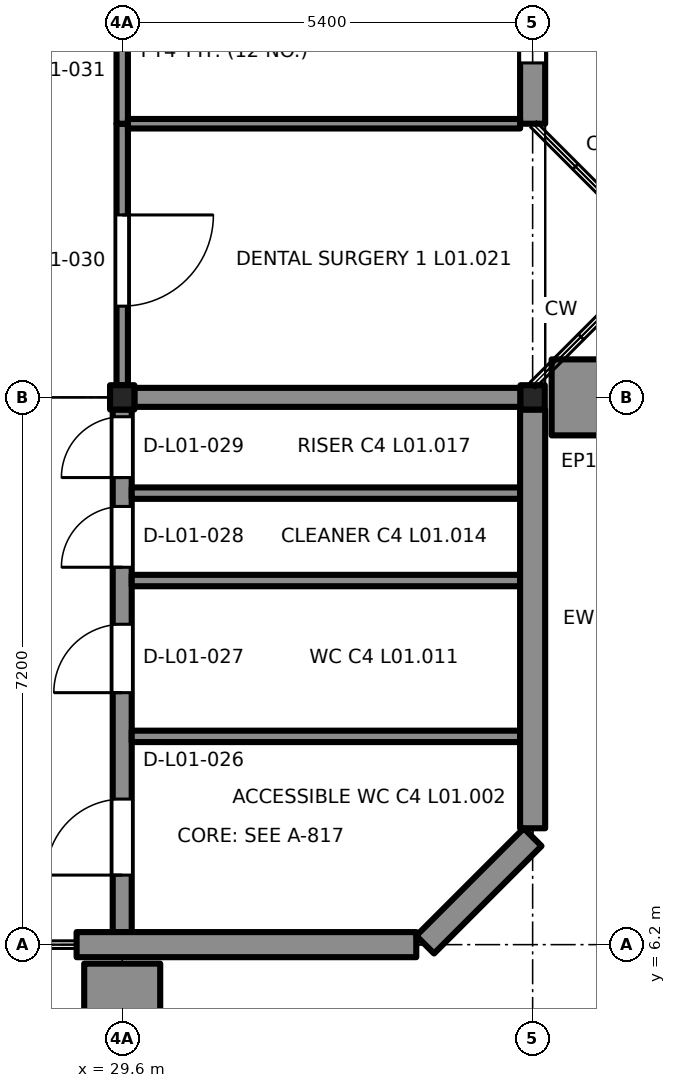
"""IFC4 building model, lengths in metres.
Left out: names, types, materials, properties, quantities, classifications, styles, units other than length and angle.
Written with IfcOpenShell. Run it as: python <this file> out.ifc"""

import sys

from ifc_helpers import new_model, si_unit, direction, frame, frame_2d, origin, origin_2d, place, context, subcontext, project, spatial, rectangle, extrude, element, fill, save


model = new_model("IFC4")
c1 = context("Model", 3, precision=1e-05, world=origin(), true_north=direction((0.0, 1.0)))
c2 = subcontext(c1, "Body", "Model", "MODEL_VIEW")
j1 = project(units=[si_unit("LENGTHUNIT", "METRE"), si_unit("PLANEANGLEUNIT", "RADIAN")], contexts=[c1])
p1 = place(None, origin())
s1 = spatial("IfcSite", under=j1, at=p1, CompositionType="ELEMENT")
p2 = place(p1, origin())
s2 = spatial("IfcBuilding", under=s1, at=p2, CompositionType="ELEMENT")
p3 = place(p2, frame((0.0, 0.0, 6.3)))
s3 = spatial("IfcBuildingStorey", under=s2, at=p3, CompositionType="ELEMENT", Elevation=6.3)
for number, where, z_axis, x_axis in (
    (1, (29.6, 13.4, 0.0), (0.0, 0.0, 1.0), (1.0, 0.0, 0.0)),
    (2, (35.0, 13.4, 0.0), (0.0, 0.0, 1.0), (1.0, 0.0, 0.0)),
):
    element("IfcColumn", number, at=place(p3, frame(where, z_axis=z_axis, x_axis=x_axis)), inside=s3, PredefinedType="COLUMN", context=c2, shape_type="SweptSolid", body=[
        extrude(rectangle(XDim=0.32, YDim=0.32, at=origin_2d()), origin(), (0.0, 0.0, 1.0), 3.9),
    ])
p4 = place(p3, frame((29.6, 6.365, 0.0), z_axis=(0.0, 0.0, 1.0), x_axis=(0.0, 1.0, 0.0)))
e3 = element("IfcWall", 3, at=p4, inside=s3, PredefinedType="SHEAR", context=c2, shape_type="SweptSolid", body=[
    extrude(rectangle(XDim=6.875, YDim=0.25, at=frame_2d((3.438, 0.0))), origin(), (0.0, 0.0, 1.0), 3.65),
])
p5 = place(p4, frame((0.75, 0.0, 0.0)))
e4 = element("IfcOpeningElement", 4, at=p5, cuts=e3, PredefinedType="OPENING", context=c2, shape_type="SweptSolid", body=[
    extrude(rectangle(XDim=1.0, YDim=2.1, at=frame_2d((0.5, 1.05))), frame((0.0, 0.135, 0.0), z_axis=(0.0, -1.0, 0.0), x_axis=(1.0, 0.0, 0.0)), (0.0, 0.0, 1.0), 0.27),
])
p6 = place(p4, frame((3.15, 0.0, 0.0)))
e5 = element("IfcOpeningElement", 5, at=p6, cuts=e3, PredefinedType="OPENING", context=c2, shape_type="SweptSolid", body=[
    extrude(rectangle(XDim=0.9, YDim=2.1, at=frame_2d((0.45, 1.05))), frame((0.0, 0.135, 0.0), z_axis=(0.0, -1.0, 0.0), x_axis=(1.0, 0.0, 0.0)), (0.0, 0.0, 1.0), 0.27),
])
p7 = place(p4, frame((4.8, 0.0, 0.0)))
e6 = element("IfcOpeningElement", 6, at=p7, cuts=e3, PredefinedType="OPENING", context=c2, shape_type="SweptSolid", body=[
    extrude(rectangle(XDim=0.8, YDim=2.1, at=frame_2d((0.4, 1.05))), frame((0.0, 0.135, 0.0), z_axis=(0.0, -1.0, 0.0), x_axis=(1.0, 0.0, 0.0)), (0.0, 0.0, 1.0), 0.27),
])
p8 = place(p4, frame((5.98, 0.0, 0.0)))
e7 = element("IfcOpeningElement", 7, at=p8, cuts=e3, PredefinedType="OPENING", context=c2, shape_type="SweptSolid", body=[
    extrude(rectangle(XDim=0.8, YDim=2.1, at=frame_2d((0.4, 1.05))), frame((0.0, 0.135, 0.0), z_axis=(0.0, -1.0, 0.0), x_axis=(1.0, 0.0, 0.0)), (0.0, 0.0, 1.0), 0.27),
])
p9 = place(p3, frame((29.76, 13.4, 0.0), z_axis=(0.0, 0.0, 1.0), x_axis=(1.0, 0.0, 0.0)))
e8 = element("IfcWall", 8, at=p9, inside=s3, PredefinedType="SHEAR", context=c2, shape_type="SweptSolid", body=[
    extrude(rectangle(XDim=5.08, YDim=0.25, at=frame_2d((2.54, 0.0))), origin(), (0.0, 0.0, 1.0), 3.65),
])
for number, where, z_axis, x_axis in (
    (9, (29.725, 8.94, 0.0), (0.0, 0.0, 1.0), (1.0, 0.0, 0.0)),
    (10, (29.725, 10.99, 0.0), (0.0, 0.0, 1.0), (1.0, 0.0, 0.0)),
    (11, (29.725, 12.14, 0.0), (0.0, 0.0, 1.0), (1.0, 0.0, 0.0)),
):
    element("IfcWall", number, at=place(p3, frame(where, z_axis=z_axis, x_axis=x_axis)), inside=s3, PredefinedType="PARTITIONING", context=c2, shape_type="SweptSolid", body=[
        extrude(rectangle(XDim=5.11, YDim=0.15, at=frame_2d((2.555, 0.0))), origin(), (0.0, 0.0, 1.0), 3.65),
    ])
p10 = place(p3, frame((35.0, 13.24, 0.0), z_axis=(0.0, 0.0, 1.0), x_axis=(0.0, -1.0, 0.0)))
e12 = element("IfcWall", 12, at=p10, inside=s3, PredefinedType="SOLIDWALL", context=c2, shape_type="SweptSolid", body=[
    extrude(rectangle(XDim=5.509, YDim=0.33, at=frame_2d((2.754, 0.0))), origin(), (0.0, 0.0, 1.0), 3.22),
])
p11 = place(p3, frame((35.0, 20.44, 0.0), z_axis=(0.0, 0.0, 1.0), x_axis=(0.0, -1.0, 0.0)))
e13 = element("IfcWall", 13, at=p11, inside=s3, PredefinedType="SOLIDWALL", context=c2, shape_type="SweptSolid", body=[
    extrude(rectangle(XDim=3.44, YDim=0.33, at=frame_2d((1.72, 0.0))), origin(), (0.0, 0.0, 1.0), 3.22),
])
p12 = place(p11, frame((1.74, 0.0, 0.6)))
e14 = element("IfcOpeningElement", 14, at=p12, cuts=e13, PredefinedType="OPENING", context=c2, shape_type="SweptSolid", body=[
    extrude(rectangle(XDim=0.9, YDim=2.4, at=frame_2d((0.45, 1.2))), frame((0.0, 0.175, 0.0), z_axis=(0.0, -1.0, 0.0), x_axis=(1.0, 0.0, 0.0)), (0.0, 0.0, 1.0), 0.35),
])
p13 = place(p11, frame((0.64, 0.0, 0.6)))
e15 = element("IfcOpeningElement", 15, at=p13, cuts=e13, PredefinedType="OPENING", context=c2, shape_type="SweptSolid", body=[
    extrude(rectangle(XDim=0.9, YDim=2.4, at=frame_2d((0.45, 1.2))), frame((0.0, 0.175, 0.0), z_axis=(0.0, -1.0, 0.0), x_axis=(1.0, 0.0, 0.0)), (0.0, 0.0, 1.0), 0.35),
])
p14 = place(p3, frame((35.625, 13.9, 0.0), z_axis=(0.0, 0.0, 1.0), x_axis=(0.0, -1.0, 0.0)))
e16 = element("IfcWall", 16, at=p14, inside=s3, PredefinedType="SOLIDWALL", context=c2, shape_type="SweptSolid", body=[
    extrude(rectangle(XDim=1.0, YDim=0.75, at=frame_2d((0.5, 0.0))), origin(), (0.0, 0.0, 1.0), 3.9),
])
p15 = place(p3, frame((33.469, 6.2, 0.0), z_axis=(0.0, 0.0, 1.0), x_axis=(-1.0, 0.0, 0.0)))
e17 = element("IfcWall", 17, at=p15, inside=s3, PredefinedType="SOLIDWALL", context=c2, shape_type="SweptSolid", body=[
    extrude(rectangle(XDim=4.469, YDim=0.33, at=frame_2d((2.234, 0.0))), origin(), (0.0, 0.0, 1.0), 3.2),
])
p16 = place(p3, frame((30.1, 5.575, 0.0), z_axis=(0.0, 0.0, 1.0), x_axis=(-1.0, 0.0, 0.0)))
e18 = element("IfcWall", 18, at=p16, inside=s3, PredefinedType="SOLIDWALL", context=c2, shape_type="SweptSolid", body=[
    extrude(rectangle(XDim=1.0, YDim=0.75, at=frame_2d((0.5, 0.0))), origin(), (0.0, 0.0, 1.0), 3.9),
])
p17 = place(p3, frame((35.0, 7.614, 0.0), z_axis=(0.0, 0.0, 1.0), x_axis=(-0.707106781187, -0.707106781187, 0.0)))
e19 = element("IfcWall", 19, at=p17, inside=s3, PredefinedType="SOLIDWALL", context=c2, shape_type="SweptSolid", body=[
    extrude(rectangle(XDim=2.0, YDim=0.33, at=frame_2d((1.0, 0.0))), origin(), (0.0, 0.0, 1.0), 3.2),
])
p18 = place(p3, frame((29.6, 17.0, 0.0), z_axis=(0.0, 0.0, 1.0), x_axis=(0.0, -1.0, 0.0)))
e20 = element("IfcWall", 20, at=p18, inside=s3, PredefinedType="PARTITIONING", context=c2, shape_type="SweptSolid", body=[
    extrude(rectangle(XDim=3.44, YDim=0.15, at=frame_2d((1.72, 0.0))), origin(), (0.0, 0.0, 1.0), 3.22),
])
p19 = place(p18, frame((1.2, 0.0, 0.0)))
e21 = element("IfcOpeningElement", 21, at=p19, cuts=e20, PredefinedType="OPENING", context=c2, shape_type="SweptSolid", body=[
    extrude(rectangle(XDim=1.2, YDim=2.1, at=frame_2d((0.6, 1.05))), frame((0.0, 0.085, 0.0), z_axis=(0.0, -1.0, 0.0), x_axis=(1.0, 0.0, 0.0)), (0.0, 0.0, 1.0), 0.17),
])
p20 = place(p3, frame((29.6, 20.44, 0.0), z_axis=(0.0, 0.0, 1.0), x_axis=(0.0, -1.0, 0.0)))
e22 = element("IfcWall", 22, at=p20, inside=s3, PredefinedType="PARTITIONING", context=c2, shape_type="SweptSolid", body=[
    extrude(rectangle(XDim=3.44, YDim=0.15, at=frame_2d((1.72, 0.0))), origin(), (0.0, 0.0, 1.0), 3.22),
])
p21 = place(p20, frame((1.04, 0.0, 0.0)))
e23 = element("IfcOpeningElement", 23, at=p21, cuts=e22, PredefinedType="OPENING", context=c2, shape_type="SweptSolid", body=[
    extrude(rectangle(XDim=1.2, YDim=2.1, at=frame_2d((0.6, 1.05))), frame((0.0, 0.085, 0.0), z_axis=(0.0, -1.0, 0.0), x_axis=(1.0, 0.0, 0.0)), (0.0, 0.0, 1.0), 0.17),
])
p22 = place(p3, frame((34.835, 17.0, 0.0), z_axis=(0.0, 0.0, 1.0), x_axis=(-1.0, 0.0, 0.0)))
e24 = element("IfcWall", 24, at=p22, inside=s3, PredefinedType="PARTITIONING", context=c2, shape_type="SweptSolid", body=[
    extrude(rectangle(XDim=5.16, YDim=0.125, at=frame_2d((2.58, 0.0))), origin(), (0.0, 0.0, 1.0), 3.38),
])
p23 = place(p5, origin())
e25 = element("IfcDoor", 25, at=p23, inside=s3, OperationType="SINGLE_SWING_LEFT", PredefinedType="DOOR", context=c2, shape_type="SweptSolid", body=[
    extrude(rectangle(XDim=1.0, YDim=2.1, at=frame_2d((0.5, 1.05))), frame((0.0, 0.025, 0.0), z_axis=(0.0, -1.0, 0.0), x_axis=(1.0, 0.0, 0.0)), (0.0, 0.0, 1.0), 0.05),
])
fill(e4, e25)
p24 = place(p6, origin())
e26 = element("IfcDoor", 26, at=p24, inside=s3, OperationType="SINGLE_SWING_LEFT", PredefinedType="DOOR", context=c2, shape_type="SweptSolid", body=[
    extrude(rectangle(XDim=0.9, YDim=2.1, at=frame_2d((0.45, 1.05))), frame((0.0, 0.025, 0.0), z_axis=(0.0, -1.0, 0.0), x_axis=(1.0, 0.0, 0.0)), (0.0, 0.0, 1.0), 0.05),
])
fill(e5, e26)
p25 = place(p7, origin())
e27 = element("IfcDoor", 27, at=p25, inside=s3, OperationType="SINGLE_SWING_LEFT", PredefinedType="DOOR", context=c2, shape_type="SweptSolid", body=[
    extrude(rectangle(XDim=0.8, YDim=2.1, at=frame_2d((0.4, 1.05))), frame((0.0, 0.025, 0.0), z_axis=(0.0, -1.0, 0.0), x_axis=(1.0, 0.0, 0.0)), (0.0, 0.0, 1.0), 0.05),
])
fill(e6, e27)
p26 = place(p8, origin())
e28 = element("IfcDoor", 28, at=p26, inside=s3, OperationType="SINGLE_SWING_LEFT", PredefinedType="DOOR", context=c2, shape_type="SweptSolid", body=[
    extrude(rectangle(XDim=0.8, YDim=2.1, at=frame_2d((0.4, 1.05))), frame((0.0, 0.025, 0.0), z_axis=(0.0, -1.0, 0.0), x_axis=(1.0, 0.0, 0.0)), (0.0, 0.0, 1.0), 0.05),
])
fill(e7, e28)
p27 = place(p12, origin())
e29 = element("IfcWindow", 29, at=p27, inside=s3, PartitioningType="SINGLE_PANEL", PredefinedType="WINDOW", context=c2, shape_type="SweptSolid", body=[
    extrude(rectangle(XDim=0.9, YDim=2.4, at=frame_2d((0.45, 1.2))), frame((0.0, -0.03, 0.0), z_axis=(0.0, -1.0, 0.0), x_axis=(1.0, 0.0, 0.0)), (0.0, 0.0, 1.0), 0.06),
])
fill(e14, e29)
p28 = place(p19, origin())
e30 = element("IfcDoor", 30, at=p28, inside=s3, OperationType="SINGLE_SWING_RIGHT", PredefinedType="DOOR", context=c2, shape_type="SweptSolid", body=[
    extrude(rectangle(XDim=1.2, YDim=2.1, at=frame_2d((0.6, 1.05))), frame((0.0, 0.025, 0.0), z_axis=(0.0, -1.0, 0.0), x_axis=(1.0, 0.0, 0.0)), (0.0, 0.0, 1.0), 0.05),
])
fill(e21, e30)
save(model, sys.argv[1])
